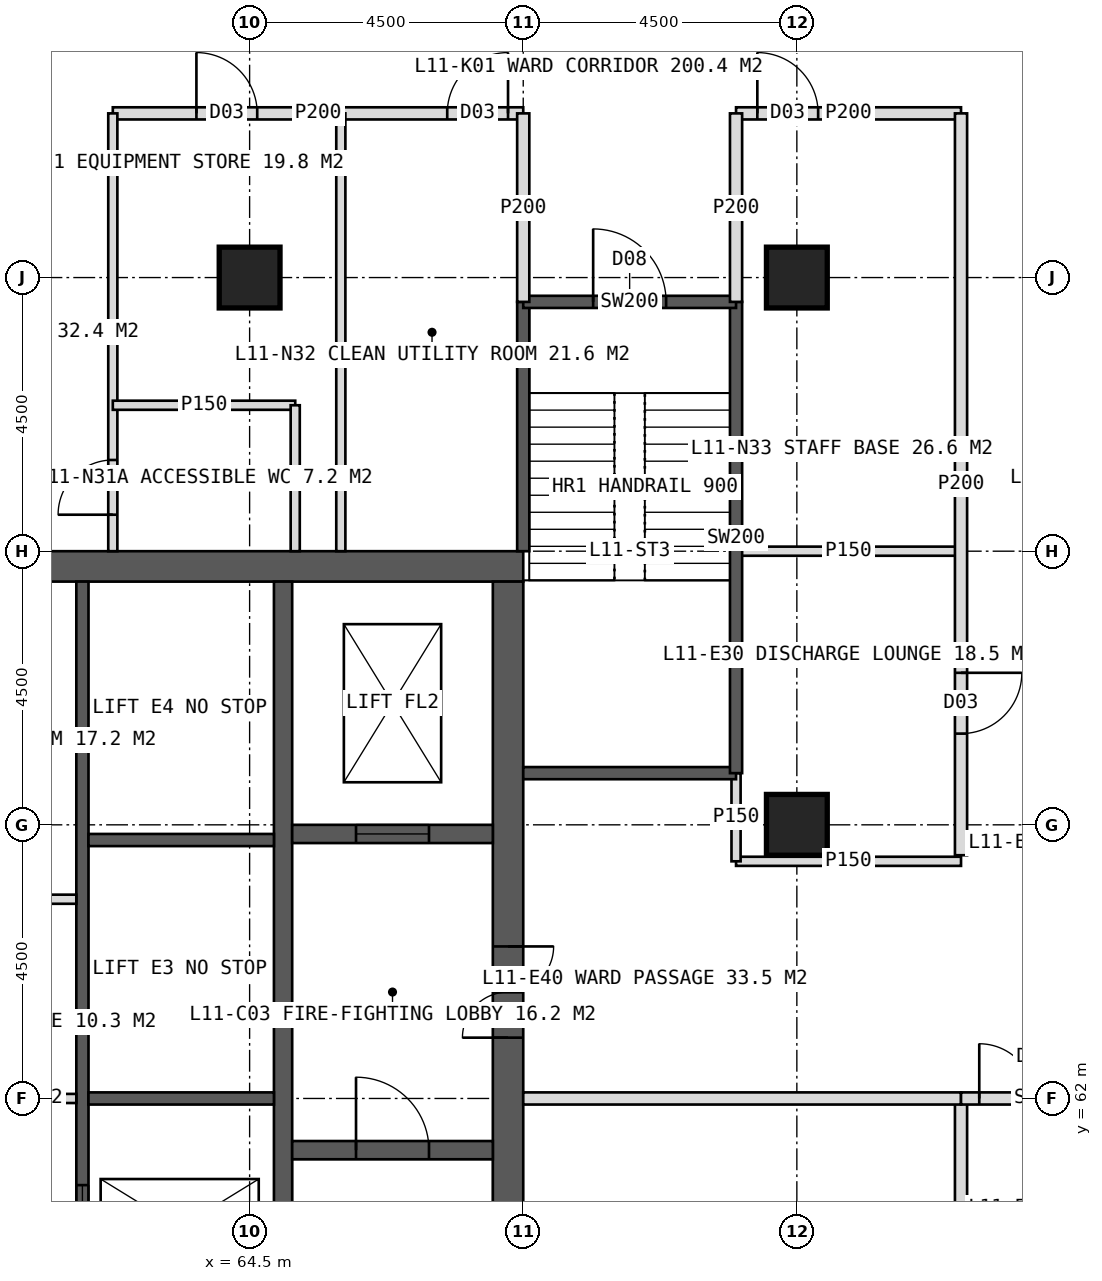
"""IFC4 building model, lengths in metres.
Left out: names, types, materials, properties, quantities, classifications, styles, units other than length and angle.
Written with IfcOpenShell. Run it as: python <this file> out.ifc"""

import sys

from ifc_helpers import new_model, si_unit, direction, frame, frame_2d, origin, origin_2d, place, context, subcontext, project, spatial, rectangle, hollow_rectangle, extrude, element, fill, save


model = new_model("IFC4")
c1 = context("Model", 3, precision=1e-05, world=origin(), true_north=direction((0.0, 1.0)))
c2 = subcontext(c1, "Body", "Model", "MODEL_VIEW")
j1 = project(units=[si_unit("LENGTHUNIT", "METRE"), si_unit("PLANEANGLEUNIT", "RADIAN")], contexts=[c1])
p1 = place(None, origin())
s1 = spatial("IfcSite", under=j1, at=p1, CompositionType="ELEMENT")
p2 = place(p1, origin())
s2 = spatial("IfcBuilding", under=s1, at=p2, CompositionType="ELEMENT")
p3 = place(p2, frame((0.0, 0.0, 51.0)))
s3 = spatial("IfcBuildingStorey", under=s2, at=p3, CompositionType="ELEMENT", Elevation=51.0)
p4 = place(p3, frame((51.0, 70.75, 0.0), z_axis=(0.0, 0.0, 1.0), x_axis=(1.0, 0.0, 0.0)))
e1 = element("IfcWall", 1, at=p4, inside=s3, PredefinedType="SHEAR", context=c2, shape_type="SweptSolid", body=[
    extrude(rectangle(XDim=18.0, YDim=0.5, at=frame_2d((9.0, 0.0))), origin(), (0.0, 0.0, 1.0), 4.0),
])
p5 = place(p4, frame((8.1, 0.0, 0.0)))
e2 = element("IfcOpeningElement", 2, at=p5, cuts=e1, PredefinedType="OPENING", context=c2, shape_type="SweptSolid", body=[
    extrude(rectangle(XDim=1.8, YDim=2.2, at=frame_2d((0.9, 1.1))), frame((0.0, 0.26, 0.0), z_axis=(0.0, -1.0, 0.0), x_axis=(1.0, 0.0, 0.0)), (0.0, 0.0, 1.0), 0.52),
])
p6 = place(p3, frame((68.75, 53.5, 0.0), z_axis=(0.0, 0.0, 1.0), x_axis=(0.0, 1.0, 0.0)))
e3 = element("IfcWall", 3, at=p6, inside=s3, PredefinedType="SHEAR", context=c2, shape_type="SweptSolid", body=[
    extrude(rectangle(XDim=17.0, YDim=0.5, at=frame_2d((8.5, 0.0))), origin(), (0.0, 0.0, 1.0), 4.0),
])
p7 = place(p6, frame((9.5, 0.0, 0.0)))
e4 = element("IfcOpeningElement", 4, at=p7, cuts=e3, PredefinedType="OPENING", context=c2, shape_type="SweptSolid", body=[
    extrude(rectangle(XDim=1.5, YDim=2.2, at=frame_2d((0.75, 1.1))), frame((0.0, 0.26, 0.0), z_axis=(0.0, -1.0, 0.0), x_axis=(1.0, 0.0, 0.0)), (0.0, 0.0, 1.0), 0.52),
])
p8 = place(p3, frame((65.05, 53.5, 0.0), z_axis=(0.0, 0.0, 1.0), x_axis=(0.0, 1.0, 0.0)))
e5 = element("IfcWall", 5, at=p8, inside=s3, PredefinedType="SHEAR", context=c2, shape_type="SweptSolid", body=[
    extrude(rectangle(XDim=17.0, YDim=0.3, at=frame_2d((8.5, 0.0))), origin(), (0.0, 0.0, 1.0), 4.0),
])
p9 = place(p3, frame((61.75, 53.5, 0.0), z_axis=(0.0, 0.0, 1.0), x_axis=(0.0, 1.0, 0.0)))
e6 = element("IfcWall", 6, at=p9, inside=s3, PredefinedType="SHEAR", context=c2, shape_type="SweptSolid", body=[
    extrude(rectangle(XDim=17.0, YDim=0.2, at=frame_2d((8.5, 0.0))), origin(), (0.0, 0.0, 1.0), 4.0),
])
p10 = place(p9, frame((1.375, 0.0, 0.0)))
e7 = element("IfcOpeningElement", 7, at=p10, cuts=e6, PredefinedType="OPENING", context=c2, shape_type="SweptSolid", body=[
    extrude(rectangle(XDim=1.4, YDim=2.2, at=frame_2d((0.7, 1.1))), frame((0.0, 0.11, 0.0), z_axis=(0.0, -1.0, 0.0), x_axis=(1.0, 0.0, 0.0)), (0.0, 0.0, 1.0), 0.22),
])
p11 = place(p9, frame((5.675, 0.0, 0.0)))
e8 = element("IfcOpeningElement", 8, at=p11, cuts=e6, PredefinedType="OPENING", context=c2, shape_type="SweptSolid", body=[
    extrude(rectangle(XDim=1.4, YDim=2.2, at=frame_2d((0.7, 1.1))), frame((0.0, 0.11, 0.0), z_axis=(0.0, -1.0, 0.0), x_axis=(1.0, 0.0, 0.0)), (0.0, 0.0, 1.0), 0.22),
])
for number, where, z_axis, x_axis in (
    (9, (61.85, 62.0, 0.0), (0.0, 0.0, 1.0), (1.0, 0.0, 0.0)),
    (10, (61.85, 66.25, 0.0), (0.0, 0.0, 1.0), (1.0, 0.0, 0.0)),
):
    element("IfcWall", number, at=place(p3, frame(where, z_axis=z_axis, x_axis=x_axis)), inside=s3, PredefinedType="SHEAR", context=c2, shape_type="SweptSolid", body=[
        extrude(rectangle(XDim=3.05, YDim=0.2, at=frame_2d((1.525, 0.0))), origin(), (0.0, 0.0, 1.0), 4.0),
    ])
p12 = place(p3, frame((65.2, 61.15, 0.0), z_axis=(0.0, 0.0, 1.0), x_axis=(1.0, 0.0, 0.0)))
e11 = element("IfcWall", 11, at=p12, inside=s3, PredefinedType="SHEAR", context=c2, shape_type="SweptSolid", body=[
    extrude(rectangle(XDim=3.3, YDim=0.3, at=frame_2d((1.65, 0.0))), origin(), (0.0, 0.0, 1.0), 4.0),
])
p13 = place(p12, frame((1.05, 0.0, 0.0)))
e12 = element("IfcOpeningElement", 12, at=p13, cuts=e11, PredefinedType="OPENING", context=c2, shape_type="SweptSolid", body=[
    extrude(rectangle(XDim=1.2, YDim=2.1, at=frame_2d((0.6, 1.05))), frame((0.0, 0.16, 0.0), z_axis=(0.0, -1.0, 0.0), x_axis=(1.0, 0.0, 0.0)), (0.0, 0.0, 1.0), 0.32),
])
p14 = place(p3, frame((65.2, 66.35, 0.0), z_axis=(0.0, 0.0, 1.0), x_axis=(1.0, 0.0, 0.0)))
e13 = element("IfcWall", 13, at=p14, inside=s3, PredefinedType="SHEAR", context=c2, shape_type="SweptSolid", body=[
    extrude(rectangle(XDim=3.3, YDim=0.3, at=frame_2d((1.65, 0.0))), origin(), (0.0, 0.0, 1.0), 4.0),
])
p15 = place(p14, frame((1.05, 0.0, 0.0)))
e14 = element("IfcOpeningElement", 14, at=p15, cuts=e13, PredefinedType="OPENING", context=c2, shape_type="SweptSolid", body=[
    extrude(rectangle(XDim=1.2, YDim=2.2, at=frame_2d((0.6, 1.1))), frame((0.0, 0.16, 0.0), z_axis=(0.0, -1.0, 0.0), x_axis=(1.0, 0.0, 0.0)), (0.0, 0.0, 1.0), 0.32),
])
for number, where, z_axis, x_axis in (
    (15, (73.5, 75.5, 0.0), (0.0, 0.0, 1.0), (1.0, 0.0, 0.0)),
    (16, (64.5, 75.5, 0.0), (0.0, 0.0, 1.0), (1.0, 0.0, 0.0)),
    (17, (73.5, 66.5, 0.0), (0.0, 0.0, 1.0), (1.0, 0.0, 0.0)),
):
    element("IfcColumn", number, at=place(p3, frame(where, z_axis=z_axis, x_axis=x_axis)), inside=s3, PredefinedType="COLUMN", context=c2, shape_type="SweptSolid", body=[
        extrude(hollow_rectangle(XDim=1.0, YDim=1.0, WallThickness=0.1, at=origin_2d()), origin(), (0.0, 0.0, 1.0), 4.0),
    ])
p16 = place(p3, frame((62.25, 78.2, 0.0), z_axis=(0.0, 0.0, 1.0), x_axis=(1.0, 0.0, 0.0)))
e18 = element("IfcWall", 18, at=p16, inside=s3, PredefinedType="PARTITIONING", context=c2, shape_type="SweptSolid", body=[
    extrude(rectangle(XDim=6.75, YDim=0.2, at=frame_2d((3.375, 0.0))), origin(), (0.0, 0.0, 1.0), 3.75),
])
p17 = place(p16, frame((1.375, 0.0, 0.0)))
e19 = element("IfcOpeningElement", 19, at=p17, cuts=e18, PredefinedType="OPENING", context=c2, shape_type="SweptSolid", body=[
    extrude(rectangle(XDim=1.0, YDim=2.1, at=frame_2d((0.5, 1.05))), frame((0.0, 0.11, 0.0), z_axis=(0.0, -1.0, 0.0), x_axis=(1.0, 0.0, 0.0)), (0.0, 0.0, 1.0), 0.22),
])
p18 = place(p16, frame((5.5, 0.0, 0.0)))
e20 = element("IfcOpeningElement", 20, at=p18, cuts=e18, PredefinedType="OPENING", context=c2, shape_type="SweptSolid", body=[
    extrude(rectangle(XDim=1.0, YDim=2.1, at=frame_2d((0.5, 1.05))), frame((0.0, 0.11, 0.0), z_axis=(0.0, -1.0, 0.0), x_axis=(1.0, 0.0, 0.0)), (0.0, 0.0, 1.0), 0.22),
])
p19 = place(p3, frame((72.5, 78.2, 0.0), z_axis=(0.0, 0.0, 1.0), x_axis=(1.0, 0.0, 0.0)))
e21 = element("IfcWall", 21, at=p19, inside=s3, PredefinedType="PARTITIONING", context=c2, shape_type="SweptSolid", body=[
    extrude(rectangle(XDim=3.7, YDim=0.2, at=frame_2d((1.85, 0.0))), origin(), (0.0, 0.0, 1.0), 3.75),
])
p20 = place(p19, frame((0.35, 0.0, 0.0)))
e22 = element("IfcOpeningElement", 22, at=p20, cuts=e21, PredefinedType="OPENING", context=c2, shape_type="SweptSolid", body=[
    extrude(rectangle(XDim=1.0, YDim=2.1, at=frame_2d((0.5, 1.05))), frame((0.0, 0.11, 0.0), z_axis=(0.0, -1.0, 0.0), x_axis=(1.0, 0.0, 0.0)), (0.0, 0.0, 1.0), 0.22),
])
p21 = place(p3, frame((62.25, 71.0, 0.0), z_axis=(0.0, 0.0, 1.0), x_axis=(0.0, 1.0, 0.0)))
e23 = element("IfcWall", 23, at=p21, inside=s3, PredefinedType="PARTITIONING", context=c2, shape_type="SweptSolid", body=[
    extrude(rectangle(XDim=7.2, YDim=0.15, at=frame_2d((3.6, 0.0))), origin(), (0.0, 0.0, 1.0), 3.75),
])
p22 = place(p21, frame((0.6, 0.0, 0.0)))
e24 = element("IfcOpeningElement", 24, at=p22, cuts=e23, PredefinedType="OPENING", context=c2, shape_type="SweptSolid", body=[
    extrude(rectangle(XDim=0.9, YDim=2.1, at=frame_2d((0.45, 1.05))), frame((0.0, 0.085, 0.0), z_axis=(0.0, -1.0, 0.0), x_axis=(1.0, 0.0, 0.0)), (0.0, 0.0, 1.0), 0.17),
])
p23 = place(p3, frame((66.0, 71.0, 0.0), z_axis=(0.0, 0.0, 1.0), x_axis=(0.0, 1.0, 0.0)))
e25 = element("IfcWall", 25, at=p23, inside=s3, PredefinedType="PARTITIONING", context=c2, shape_type="SweptSolid", body=[
    extrude(rectangle(XDim=7.2, YDim=0.15, at=frame_2d((3.6, 0.0))), origin(), (0.0, 0.0, 1.0), 3.75),
])
p24 = place(p3, frame((62.25, 73.4, 0.0), z_axis=(0.0, 0.0, 1.0), x_axis=(1.0, 0.0, 0.0)))
e26 = element("IfcWall", 26, at=p24, inside=s3, PredefinedType="PARTITIONING", context=c2, shape_type="SweptSolid", body=[
    extrude(rectangle(XDim=3.0, YDim=0.15, at=frame_2d((1.5, 0.0))), origin(), (0.0, 0.0, 1.0), 3.75),
])
p25 = place(p3, frame((65.25, 71.0, 0.0), z_axis=(0.0, 0.0, 1.0), x_axis=(0.0, 1.0, 0.0)))
e27 = element("IfcWall", 27, at=p25, inside=s3, PredefinedType="PARTITIONING", context=c2, shape_type="SweptSolid", body=[
    extrude(rectangle(XDim=2.4, YDim=0.15, at=frame_2d((1.2, 0.0))), origin(), (0.0, 0.0, 1.0), 3.75),
])
p26 = place(p3, frame((72.5, 71.0, 0.0), z_axis=(0.0, 0.0, 1.0), x_axis=(1.0, 0.0, 0.0)))
e28 = element("IfcWall", 28, at=p26, inside=s3, PredefinedType="PARTITIONING", context=c2, shape_type="SweptSolid", body=[
    extrude(rectangle(XDim=3.7, YDim=0.15, at=frame_2d((1.85, 0.0))), origin(), (0.0, 0.0, 1.0), 3.75),
])
p27 = place(p3, frame((76.2, 78.2, 0.0), z_axis=(0.0, 0.0, 1.0), x_axis=(0.0, -1.0, 0.0)))
e29 = element("IfcWall", 29, at=p27, inside=s3, PredefinedType="PARTITIONING", context=c2, shape_type="SweptSolid", body=[
    extrude(rectangle(XDim=12.2, YDim=0.2, at=frame_2d((6.1, 0.0))), origin(), (0.0, 0.0, 1.0), 3.75),
])
p28 = place(p27, frame((9.2, 0.0, 0.0)))
e30 = element("IfcOpeningElement", 30, at=p28, cuts=e29, PredefinedType="OPENING", context=c2, shape_type="SweptSolid", body=[
    extrude(rectangle(XDim=1.0, YDim=2.1, at=frame_2d((0.5, 1.05))), frame((0.0, 0.11, 0.0), z_axis=(0.0, -1.0, 0.0), x_axis=(1.0, 0.0, 0.0)), (0.0, 0.0, 1.0), 0.22),
])
p29 = place(p3, frame((76.2, 62.0, 0.0), z_axis=(0.0, 0.0, 1.0), x_axis=(0.0, -1.0, 0.0)))
e31 = element("IfcWall", 31, at=p29, inside=s3, PredefinedType="PARTITIONING", context=c2, shape_type="SweptSolid", body=[
    extrude(rectangle(XDim=16.2, YDim=0.2, at=frame_2d((8.1, 0.0))), origin(), (0.0, 0.0, 1.0), 3.75),
])
p30 = place(p29, frame((4.0, 0.0, 0.0)))
e32 = element("IfcOpeningElement", 32, at=p30, cuts=e31, PredefinedType="OPENING", context=c2, shape_type="SweptSolid", body=[
    extrude(rectangle(XDim=1.0, YDim=2.1, at=frame_2d((0.5, 1.05))), frame((0.0, 0.11, 0.0), z_axis=(0.0, -1.0, 0.0), x_axis=(1.0, 0.0, 0.0)), (0.0, 0.0, 1.0), 0.22),
])
p31 = place(p29, frame((12.1, 0.0, 0.0)))
e33 = element("IfcOpeningElement", 33, at=p31, cuts=e31, PredefinedType="OPENING", context=c2, shape_type="SweptSolid", body=[
    extrude(rectangle(XDim=1.0, YDim=2.1, at=frame_2d((0.5, 1.05))), frame((0.0, 0.11, 0.0), z_axis=(0.0, -1.0, 0.0), x_axis=(1.0, 0.0, 0.0)), (0.0, 0.0, 1.0), 0.22),
])
p32 = place(p3, frame((72.5, 65.9, 0.0), z_axis=(0.0, 0.0, 1.0), x_axis=(1.0, 0.0, 0.0)))
e34 = element("IfcWall", 34, at=p32, inside=s3, PredefinedType="PARTITIONING", context=c2, shape_type="SweptSolid", body=[
    extrude(rectangle(XDim=3.7, YDim=0.15, at=frame_2d((1.85, 0.0))), origin(), (0.0, 0.0, 1.0), 3.75),
])
p33 = place(p3, frame((69.0, 62.0, 0.0), z_axis=(0.0, 0.0, 1.0), x_axis=(1.0, 0.0, 0.0)))
e35 = element("IfcWall", 35, at=p33, inside=s3, PredefinedType="SOLIDWALL", context=c2, shape_type="SweptSolid", body=[
    extrude(rectangle(XDim=7.2, YDim=0.2, at=frame_2d((3.6, 0.0))), origin(), (0.0, 0.0, 1.0), 2.75),
])
p34 = place(p3, frame((76.2, 62.0, 0.0), z_axis=(0.0, 0.0, 1.0), x_axis=(1.0, 0.0, 0.0)))
e36 = element("IfcWall", 36, at=p34, inside=s3, PredefinedType="SOLIDWALL", context=c2, shape_type="SweptSolid", body=[
    extrude(rectangle(XDim=2.7, YDim=0.2, at=frame_2d((1.35, 0.0))), origin(), (0.0, 0.0, 1.0), 2.75),
])
p35 = place(p34, frame((0.3, 0.0, 0.0)))
e37 = element("IfcOpeningElement", 37, at=p35, cuts=e36, PredefinedType="OPENING", context=c2, shape_type="SweptSolid", body=[
    extrude(rectangle(XDim=1.8, YDim=2.2, at=frame_2d((0.9, 1.1))), frame((0.0, 0.11, 0.0), z_axis=(0.0, -1.0, 0.0), x_axis=(1.0, 0.0, 0.0)), (0.0, 0.0, 1.0), 0.22),
])
p36 = place(p3, frame((58.35, 62.0, 0.0), z_axis=(0.0, 0.0, 1.0), x_axis=(1.0, 0.0, 0.0)))
e38 = element("IfcWall", 38, at=p36, inside=s3, PredefinedType="PARTITIONING", context=c2, shape_type="SweptSolid", body=[
    extrude(rectangle(XDim=3.3, YDim=0.15, at=frame_2d((1.65, 0.0))), origin(), (0.0, 0.0, 1.0), 3.75),
])
p37 = place(p36, frame((1.15, 0.0, 0.0)))
e39 = element("IfcOpeningElement", 39, at=p37, cuts=e38, PredefinedType="OPENING", context=c2, shape_type="SweptSolid", body=[
    extrude(rectangle(XDim=1.0, YDim=2.1, at=frame_2d((0.5, 1.05))), frame((0.0, 0.085, 0.0), z_axis=(0.0, -1.0, 0.0), x_axis=(1.0, 0.0, 0.0)), (0.0, 0.0, 1.0), 0.17),
])
p38 = place(p3, frame((58.35, 65.277, 0.0), z_axis=(0.0, 0.0, 1.0), x_axis=(1.0, 0.0, 0.0)))
e40 = element("IfcWall", 40, at=p38, inside=s3, PredefinedType="PARTITIONING", context=c2, shape_type="SweptSolid", body=[
    extrude(rectangle(XDim=3.3, YDim=0.15, at=frame_2d((1.65, 0.0))), origin(), (0.0, 0.0, 1.0), 3.75),
])
p39 = place(p3, frame((72.5, 65.9, 0.0), z_axis=(0.0, 0.0, 1.0), x_axis=(0.0, 1.0, 0.0)))
e41 = element("IfcWall", 41, at=p39, inside=s3, PredefinedType="PARTITIONING", context=c2, shape_type="SweptSolid", body=[
    extrude(rectangle(XDim=1.45, YDim=0.15, at=frame_2d((0.725, 0.0))), origin(), (0.0, 0.0, 1.0), 3.75),
])
p40 = place(p3, frame((69.0, 71.0, 0.0), z_axis=(0.0, 0.0, 1.0), x_axis=(0.0, 1.0, 0.0)))
e42 = element("IfcWall", 42, at=p40, inside=s3, PredefinedType="SOLIDWALL", context=c2, shape_type="SweptSolid", body=[
    extrude(rectangle(XDim=4.1, YDim=0.2, at=frame_2d((2.05, 0.0))), origin(), (0.0, 0.0, 1.0), 3.75),
])
p41 = place(p3, frame((69.0, 67.35, 0.0), z_axis=(0.0, 0.0, 1.0), x_axis=(1.0, 0.0, 0.0)))
e43 = element("IfcWall", 43, at=p41, inside=s3, PredefinedType="SOLIDWALL", context=c2, shape_type="SweptSolid", body=[
    extrude(rectangle(XDim=3.5, YDim=0.2, at=frame_2d((1.75, 0.0))), origin(), (0.0, 0.0, 1.0), 3.75),
])
p42 = place(p3, frame((72.5, 67.35, 0.0), z_axis=(0.0, 0.0, 1.0), x_axis=(0.0, 1.0, 0.0)))
e44 = element("IfcWall", 44, at=p42, inside=s3, PredefinedType="SOLIDWALL", context=c2, shape_type="SweptSolid", body=[
    extrude(rectangle(XDim=7.75, YDim=0.2, at=frame_2d((3.875, 0.0))), origin(), (0.0, 0.0, 1.0), 3.75),
])
p43 = place(p3, frame((69.0, 75.1, 0.0), z_axis=(0.0, 0.0, 1.0), x_axis=(1.0, 0.0, 0.0)))
e45 = element("IfcWall", 45, at=p43, inside=s3, PredefinedType="SOLIDWALL", context=c2, shape_type="SweptSolid", body=[
    extrude(rectangle(XDim=3.5, YDim=0.2, at=frame_2d((1.75, 0.0))), origin(), (0.0, 0.0, 1.0), 3.75),
])
p44 = place(p43, frame((1.15, 0.0, 0.0)))
e46 = element("IfcOpeningElement", 46, at=p44, cuts=e45, PredefinedType="OPENING", context=c2, shape_type="SweptSolid", body=[
    extrude(rectangle(XDim=1.2, YDim=2.1, at=frame_2d((0.6, 1.05))), frame((0.0, 0.11, 0.0), z_axis=(0.0, -1.0, 0.0), x_axis=(1.0, 0.0, 0.0)), (0.0, 0.0, 1.0), 0.22),
])
for number, where, z_axis, x_axis in (
    (47, (69.0, 75.1, 0.0), (0.0, 0.0, 1.0), (0.0, 1.0, 0.0)),
    (48, (72.5, 75.1, 0.0), (0.0, 0.0, 1.0), (0.0, 1.0, 0.0)),
):
    element("IfcWall", number, at=place(p3, frame(where, z_axis=z_axis, x_axis=x_axis)), inside=s3, PredefinedType="PARTITIONING", context=c2, shape_type="SweptSolid", body=[
        extrude(rectangle(XDim=3.1, YDim=0.2, at=frame_2d((1.55, 0.0))), origin(), (0.0, 0.0, 1.0), 3.75),
    ])
p45 = place(p22, origin())
e49 = element("IfcDoor", 49, at=p45, inside=s3, OperationType="SINGLE_SWING_LEFT", PredefinedType="DOOR", context=c2, shape_type="SweptSolid", body=[
    extrude(rectangle(XDim=0.9, YDim=2.1, at=frame_2d((0.45, 1.05))), frame((0.0, 0.025, 0.0), z_axis=(0.0, -1.0, 0.0), x_axis=(1.0, 0.0, 0.0)), (0.0, 0.0, 1.0), 0.05),
])
fill(e24, e49)
p46 = place(p17, origin())
e50 = element("IfcDoor", 50, at=p46, inside=s3, OperationType="SINGLE_SWING_LEFT", PredefinedType="DOOR", context=c2, shape_type="SweptSolid", body=[
    extrude(rectangle(XDim=1.0, YDim=2.1, at=frame_2d((0.5, 1.05))), frame((0.0, 0.025, 0.0), z_axis=(0.0, -1.0, 0.0), x_axis=(1.0, 0.0, 0.0)), (0.0, 0.0, 1.0), 0.05),
])
fill(e19, e50)
p47 = place(p18, origin())
e51 = element("IfcDoor", 51, at=p47, inside=s3, OperationType="SINGLE_SWING_RIGHT", PredefinedType="DOOR", context=c2, shape_type="SweptSolid", body=[
    extrude(rectangle(XDim=1.0, YDim=2.1, at=frame_2d((0.5, 1.05))), frame((0.0, 0.025, 0.0), z_axis=(0.0, -1.0, 0.0), x_axis=(1.0, 0.0, 0.0)), (0.0, 0.0, 1.0), 0.05),
])
fill(e20, e51)
p48 = place(p20, origin())
e52 = element("IfcDoor", 52, at=p48, inside=s3, OperationType="SINGLE_SWING_LEFT", PredefinedType="DOOR", context=c2, shape_type="SweptSolid", body=[
    extrude(rectangle(XDim=1.0, YDim=2.1, at=frame_2d((0.5, 1.05))), frame((0.0, 0.025, 0.0), z_axis=(0.0, -1.0, 0.0), x_axis=(1.0, 0.0, 0.0)), (0.0, 0.0, 1.0), 0.05),
])
fill(e22, e52)
p49 = place(p28, origin())
e53 = element("IfcDoor", 53, at=p49, inside=s3, OperationType="SINGLE_SWING_LEFT", PredefinedType="DOOR", context=c2, shape_type="SweptSolid", body=[
    extrude(rectangle(XDim=1.0, YDim=2.1, at=frame_2d((0.5, 1.05))), frame((0.0, 0.025, 0.0), z_axis=(0.0, -1.0, 0.0), x_axis=(1.0, 0.0, 0.0)), (0.0, 0.0, 1.0), 0.05),
])
fill(e30, e53)
p50 = place(p35, origin())
e54 = element("IfcDoor", 54, at=p50, inside=s3, OperationType="DOUBLE_DOOR_DOUBLE_SWING", PredefinedType="DOOR", context=c2, shape_type="SweptSolid", body=[
    extrude(rectangle(XDim=1.8, YDim=2.2, at=frame_2d((0.9, 1.1))), frame((0.0, 0.025, 0.0), z_axis=(0.0, -1.0, 0.0), x_axis=(1.0, 0.0, 0.0)), (0.0, 0.0, 1.0), 0.05),
])
fill(e37, e54)
p51 = place(p7, origin())
e55 = element("IfcDoor", 55, at=p51, inside=s3, OperationType="DOUBLE_DOOR_SINGLE_SWING", PredefinedType="DOOR", context=c2, shape_type="SweptSolid", body=[
    extrude(rectangle(XDim=1.5, YDim=2.2, at=frame_2d((0.75, 1.1))), frame((0.0, 0.025, 0.0), z_axis=(0.0, -1.0, 0.0), x_axis=(1.0, 0.0, 0.0)), (0.0, 0.0, 1.0), 0.05),
])
fill(e4, e55)
p52 = place(p13, origin())
e56 = element("IfcDoor", 56, at=p52, inside=s3, OperationType="SINGLE_SWING_LEFT", PredefinedType="DOOR", context=c2, shape_type="SweptSolid", body=[
    extrude(rectangle(XDim=1.2, YDim=2.1, at=frame_2d((0.6, 1.05))), frame((0.0, 0.025, 0.0), z_axis=(0.0, -1.0, 0.0), x_axis=(1.0, 0.0, 0.0)), (0.0, 0.0, 1.0), 0.05),
])
fill(e12, e56)
p53 = place(p15, origin())
e57 = element("IfcDoor", 57, at=p53, inside=s3, OperationType="SLIDING_TO_LEFT", PredefinedType="DOOR", context=c2, shape_type="SweptSolid", body=[
    extrude(rectangle(XDim=1.2, YDim=2.2, at=frame_2d((0.6, 1.1))), frame((0.0, 0.025, 0.0), z_axis=(0.0, -1.0, 0.0), x_axis=(1.0, 0.0, 0.0)), (0.0, 0.0, 1.0), 0.05),
])
fill(e14, e57)
p54 = place(p11, origin())
e58 = element("IfcDoor", 58, at=p54, inside=s3, OperationType="SLIDING_TO_LEFT", PredefinedType="DOOR", context=c2, shape_type="SweptSolid", body=[
    extrude(rectangle(XDim=1.4, YDim=2.2, at=frame_2d((0.7, 1.1))), frame((0.0, 0.025, 0.0), z_axis=(0.0, -1.0, 0.0), x_axis=(1.0, 0.0, 0.0)), (0.0, 0.0, 1.0), 0.05),
])
fill(e8, e58)
p55 = place(p44, origin())
e59 = element("IfcDoor", 59, at=p55, inside=s3, OperationType="SINGLE_SWING_LEFT", PredefinedType="DOOR", context=c2, shape_type="SweptSolid", body=[
    extrude(rectangle(XDim=1.2, YDim=2.1, at=frame_2d((0.6, 1.05))), frame((0.0, 0.025, 0.0), z_axis=(0.0, -1.0, 0.0), x_axis=(1.0, 0.0, 0.0)), (0.0, 0.0, 1.0), 0.05),
])
fill(e46, e59)
save(model, sys.argv[1])
